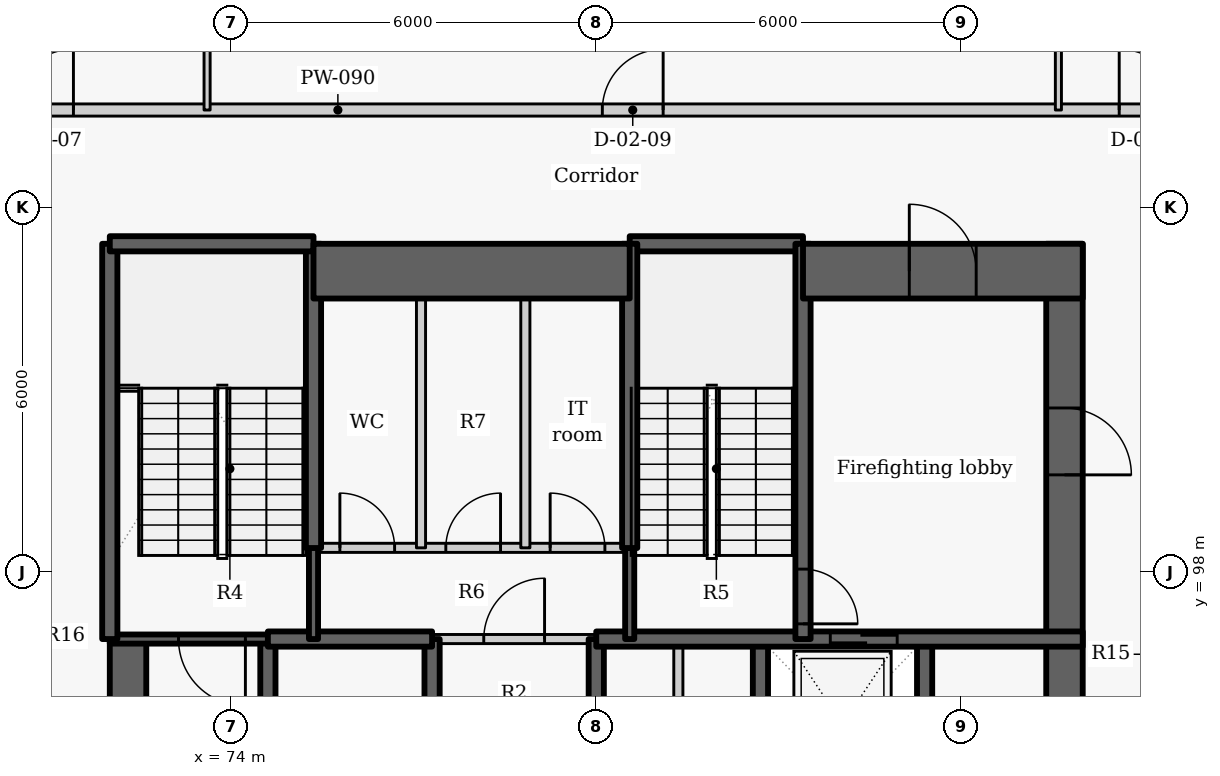
"""IFC4 building model, lengths in metres.
Left out: names, types, materials, properties, quantities, classifications, styles, units other than length and angle.
Written with IfcOpenShell. Run it as: python <this file> out.ifc"""

import sys

from ifc_helpers import new_model, si_unit, direction, frame, frame_2d, origin, place, context, subcontext, project, spatial, rectangle, extrude, element, fill, save


model = new_model("IFC4")
c1 = context("Model", 3, precision=1e-05, world=origin(), true_north=direction((0.0, 1.0)))
c2 = subcontext(c1, "Body", "Model", "MODEL_VIEW")
j1 = project(units=[si_unit("LENGTHUNIT", "METRE"), si_unit("PLANEANGLEUNIT", "RADIAN")], contexts=[c1])
p1 = place(None, origin())
s1 = spatial("IfcSite", under=j1, at=p1, CompositionType="ELEMENT")
p2 = place(p1, origin())
s2 = spatial("IfcBuilding", under=s1, at=p2, CompositionType="ELEMENT")
p3 = place(p2, frame((0.0, 0.0, 15.6)))
s3 = spatial("IfcBuildingStorey", under=s2, at=p3, CompositionType="ELEMENT", Elevation=15.6)
p4 = place(p3, frame((74.6, 94.1, -0.3), z_axis=(0.0, 0.0, 1.0), x_axis=(0.0, 1.0, 0.0)))
e1 = element("IfcWall", 1, at=p4, inside=s3, PredefinedType="SHEAR", context=c2, shape_type="SweptSolid", body=[
    extrude(rectangle(XDim=2.8, YDim=0.25, at=frame_2d((1.4, 0.0))), origin(), (0.0, 0.0, 1.0), 4.2),
])
p5 = place(p3, frame((72.3, 87.8, -0.3), z_axis=(0.0, 0.0, 1.0), x_axis=(0.0, 1.0, 0.0)))
e2 = element("IfcWall", 2, at=p5, inside=s3, PredefinedType="SHEAR", context=c2, shape_type="SweptSolid", body=[
    extrude(rectangle(XDim=9.1, YDim=0.6, at=frame_2d((4.55, 0.0))), origin(), (0.0, 0.0, 1.0), 4.2),
])
for number, where, z_axis, x_axis in (
    (3, (77.3, 94.1, -0.3), (0.0, 0.0, 1.0), (0.0, 1.0, 0.0)),
    (4, (80.0, 94.1, -0.3), (0.0, 0.0, 1.0), (0.0, 1.0, 0.0)),
    (5, (82.7, 94.1, -0.3), (0.0, 0.0, 1.0), (0.0, 1.0, 0.0)),
    (6, (85.4, 94.1, -0.3), (0.0, 0.0, 1.0), (0.0, 1.0, 0.0)),
):
    element("IfcWall", number, at=place(p3, frame(where, z_axis=z_axis, x_axis=x_axis)), inside=s3, PredefinedType="SHEAR", context=c2, shape_type="SweptSolid", body=[
        extrude(rectangle(XDim=2.8, YDim=0.25, at=frame_2d((1.4, 0.0))), origin(), (0.0, 0.0, 1.0), 4.2),
    ])
p6 = place(p3, frame((87.7, 103.4, -0.3), z_axis=(0.0, 0.0, 1.0), x_axis=(0.0, -1.0, 0.0)))
e7 = element("IfcWall", 7, at=p6, inside=s3, PredefinedType="SHEAR", context=c2, shape_type="SweptSolid", body=[
    extrude(rectangle(XDim=15.6, YDim=0.6, at=frame_2d((7.8, 0.0))), origin(), (0.0, 0.0, 1.0), 4.2),
])
p7 = place(p6, frame((2.7, 0.0, 0.3)))
e8 = element("IfcOpeningElement", 8, at=p7, cuts=e7, PredefinedType="OPENING", context=c2, shape_type="SweptSolid", body=[
    extrude(rectangle(XDim=1.1, YDim=2.1, at=frame_2d((0.55, 1.05))), frame((0.0, 0.31, 0.0), z_axis=(0.0, -1.0, 0.0), x_axis=(1.0, 0.0, 0.0)), (0.0, 0.0, 1.0), 0.62),
])
p8 = place(p3, frame((74.6, 96.9, -0.3), z_axis=(0.0, 0.0, 1.0), x_axis=(-1.0, 0.0, 0.0)))
e9 = element("IfcWall", 9, at=p8, inside=s3, PredefinedType="SHEAR", context=c2, shape_type="SweptSolid", body=[
    extrude(rectangle(XDim=2.6, YDim=0.15, at=frame_2d((1.3, 0.0))), origin(), (0.0, 0.0, 1.0), 4.2),
])
p9 = place(p8, frame((0.37, 0.0, 0.3)))
e10 = element("IfcOpeningElement", 10, at=p9, cuts=e9, PredefinedType="OPENING", context=c2, shape_type="SweptSolid", body=[
    extrude(rectangle(XDim=1.1, YDim=2.1, at=frame_2d((0.55, 1.05))), frame((0.0, 0.085, 0.0), z_axis=(0.0, -1.0, 0.0), x_axis=(1.0, 0.0, 0.0)), (0.0, 0.0, 1.0), 0.17),
])
p10 = place(p3, frame((74.6, 96.9, -0.3), z_axis=(0.0, 0.0, 1.0), x_axis=(1.0, 0.0, 0.0)))
e11 = element("IfcWall", 11, at=p10, inside=s3, PredefinedType="SHEAR", context=c2, shape_type="SweptSolid", body=[
    extrude(rectangle(XDim=2.7, YDim=0.25, at=frame_2d((1.35, 0.0))), origin(), (0.0, 0.0, 1.0), 4.2),
])
p11 = place(p3, frame((80.0, 96.9, -0.3), z_axis=(0.0, 0.0, 1.0), x_axis=(1.0, 0.0, 0.0)))
e12 = element("IfcWall", 12, at=p11, inside=s3, PredefinedType="SHEAR", context=c2, shape_type="SweptSolid", body=[
    extrude(rectangle(XDim=8.0, YDim=0.25, at=frame_2d((4.0, 0.0))), origin(), (0.0, 0.0, 1.0), 4.2),
])
p12 = place(p11, frame((3.849, 0.0, 0.3)))
e13 = element("IfcOpeningElement", 13, at=p12, cuts=e12, PredefinedType="OPENING", context=c2, shape_type="SweptSolid", body=[
    extrude(rectangle(XDim=1.1, YDim=2.1, at=frame_2d((0.55, 1.05))), frame((0.0, 0.135, 0.0), z_axis=(0.0, -1.0, 0.0), x_axis=(1.0, 0.0, 0.0)), (0.0, 0.0, 1.0), 0.27),
])
p13 = place(p3, frame((77.3, 96.9, 0.0), z_axis=(0.0, 0.0, 1.0), x_axis=(1.0, 0.0, 0.0)))
e14 = element("IfcWall", 14, at=p13, inside=s3, PredefinedType="PARTITIONING", context=c2, shape_type="SweptSolid", body=[
    extrude(rectangle(XDim=2.7, YDim=0.15, at=frame_2d((1.35, 0.0))), origin(), (0.0, 0.0, 1.0), 3.9),
])
p14 = place(p13, frame((0.85, 0.0, 0.0)))
e15 = element("IfcOpeningElement", 15, at=p14, cuts=e14, PredefinedType="OPENING", context=c2, shape_type="SweptSolid", body=[
    extrude(rectangle(XDim=1.0, YDim=2.1, at=frame_2d((0.5, 1.05))), frame((0.0, 0.085, 0.0), z_axis=(0.0, -1.0, 0.0), x_axis=(1.0, 0.0, 0.0)), (0.0, 0.0, 1.0), 0.17),
])
p15 = place(p3, frame((81.35, 94.1, 0.0), z_axis=(0.0, 0.0, 1.0), x_axis=(0.0, 1.0, 0.0)))
e16 = element("IfcWall", 16, at=p15, inside=s3, PredefinedType="PARTITIONING", context=c2, shape_type="SweptSolid", body=[
    extrude(rectangle(XDim=2.8, YDim=0.15, at=frame_2d((1.4, 0.0))), origin(), (0.0, 0.0, 1.0), 3.9),
])
p16 = place(p3, frame((75.35, 96.9, -0.3), z_axis=(0.0, 0.0, 1.0), x_axis=(0.0, 1.0, 0.0)))
e17 = element("IfcWall", 17, at=p16, inside=s3, PredefinedType="SHEAR", context=c2, shape_type="SweptSolid", body=[
    extrude(rectangle(XDim=1.503, YDim=0.15, at=frame_2d((0.751, 0.0))), origin(), (0.0, 0.0, 1.0), 4.2),
])
p17 = place(p3, frame((75.35, 98.397, -0.3), z_axis=(0.0, 0.0, 1.0), x_axis=(0.0, 1.0, 0.0)))
e18 = element("IfcWall", 18, at=p17, inside=s3, PredefinedType="SHEAR", context=c2, shape_type="SweptSolid", body=[
    extrude(rectangle(XDim=5.003, YDim=0.25, at=frame_2d((2.501, 0.0))), origin(), (0.0, 0.0, 1.0), 4.2),
])
p18 = place(p3, frame((72.0, 96.9, -0.3), z_axis=(0.0, 0.0, 1.0), x_axis=(0.0, 1.0, 0.0)))
e19 = element("IfcWall", 19, at=p18, inside=s3, PredefinedType="SHEAR", context=c2, shape_type="SweptSolid", body=[
    extrude(rectangle(XDim=6.5, YDim=0.25, at=frame_2d((3.25, 0.0))), origin(), (0.0, 0.0, 1.0), 4.2),
])
p19 = place(p3, frame((72.0, 103.4, -0.3), z_axis=(0.0, 0.0, 1.0), x_axis=(1.0, 0.0, 0.0)))
e20 = element("IfcWall", 20, at=p19, inside=s3, PredefinedType="SHEAR", context=c2, shape_type="SweptSolid", body=[
    extrude(rectangle(XDim=3.35, YDim=0.25, at=frame_2d((1.675, 0.0))), origin(), (0.0, 0.0, 1.0), 4.2),
])
p20 = place(p3, frame((80.55, 103.4, -0.3), z_axis=(0.0, 0.0, 1.0), x_axis=(1.0, 0.0, 0.0)))
e21 = element("IfcWall", 21, at=p20, inside=s3, PredefinedType="SHEAR", context=c2, shape_type="SweptSolid", body=[
    extrude(rectangle(XDim=2.85, YDim=0.25, at=frame_2d((1.425, 0.0))), origin(), (0.0, 0.0, 1.0), 4.2),
])
p21 = place(p3, frame((83.4, 103.4, -0.3), z_axis=(0.0, 0.0, 1.0), x_axis=(0.0, -1.0, 0.0)))
e22 = element("IfcWall", 22, at=p21, inside=s3, PredefinedType="SHEAR", context=c2, shape_type="SweptSolid", body=[
    extrude(rectangle(XDim=6.5, YDim=0.25, at=frame_2d((3.25, 0.0))), origin(), (0.0, 0.0, 1.0), 4.2),
])
p22 = place(p21, frame((5.35, 0.0, 0.3)))
e23 = element("IfcOpeningElement", 23, at=p22, cuts=e22, PredefinedType="OPENING", context=c2, shape_type="SweptSolid", body=[
    extrude(rectangle(XDim=0.9, YDim=2.1, at=frame_2d((0.45, 1.05))), frame((0.0, 0.135, 0.0), z_axis=(0.0, -1.0, 0.0), x_axis=(1.0, 0.0, 0.0)), (0.0, 0.0, 1.0), 0.27),
])
p23 = place(p3, frame((80.55, 96.9, -0.3), z_axis=(0.0, 0.0, 1.0), x_axis=(0.0, 1.0, 0.0)))
e24 = element("IfcWall", 24, at=p23, inside=s3, PredefinedType="SHEAR", context=c2, shape_type="SweptSolid", body=[
    extrude(rectangle(XDim=1.503, YDim=0.15, at=frame_2d((0.751, 0.0))), origin(), (0.0, 0.0, 1.0), 4.2),
])
p24 = place(p3, frame((80.55, 98.397, -0.3), z_axis=(0.0, 0.0, 1.0), x_axis=(0.0, 1.0, 0.0)))
e25 = element("IfcWall", 25, at=p24, inside=s3, PredefinedType="SHEAR", context=c2, shape_type="SweptSolid", body=[
    extrude(rectangle(XDim=5.003, YDim=0.25, at=frame_2d((2.501, 0.0))), origin(), (0.0, 0.0, 1.0), 4.2),
])
p25 = place(p3, frame((75.35, 102.95, -0.3), z_axis=(0.0, 0.0, 1.0), x_axis=(1.0, 0.0, 0.0)))
e26 = element("IfcWall", 26, at=p25, inside=s3, PredefinedType="SHEAR", context=c2, shape_type="SweptSolid", body=[
    extrude(rectangle(XDim=5.2, YDim=0.9, at=frame_2d((2.6, 0.0))), origin(), (0.0, 0.0, 1.0), 4.2),
])
p26 = place(p3, frame((83.4, 102.95, -0.3), z_axis=(0.0, 0.0, 1.0), x_axis=(1.0, 0.0, 0.0)))
e27 = element("IfcWall", 27, at=p26, inside=s3, PredefinedType="SHEAR", context=c2, shape_type="SweptSolid", body=[
    extrude(rectangle(XDim=4.6, YDim=0.9, at=frame_2d((2.3, 0.0))), origin(), (0.0, 0.0, 1.0), 4.2),
])
p27 = place(p26, frame((1.748, 0.0, 0.3)))
e28 = element("IfcOpeningElement", 28, at=p27, cuts=e27, PredefinedType="OPENING", context=c2, shape_type="SweptSolid", body=[
    extrude(rectangle(XDim=1.1, YDim=2.1, at=frame_2d((0.55, 1.05))), frame((0.0, 0.46, 0.0), z_axis=(0.0, -1.0, 0.0), x_axis=(1.0, 0.0, 0.0)), (0.0, 0.0, 1.0), 0.92),
])
p28 = place(p3, frame((75.35, 98.4, 0.0), z_axis=(0.0, 0.0, 1.0), x_axis=(1.0, 0.0, 0.0)))
e29 = element("IfcWall", 29, at=p28, inside=s3, PredefinedType="PARTITIONING", context=c2, shape_type="SweptSolid", body=[
    extrude(rectangle(XDim=5.2, YDim=0.15, at=frame_2d((2.6, 0.0))), origin(), (0.0, 0.0, 1.0), 3.9),
])
p29 = place(p28, frame((0.434, 0.0, 0.0)))
e30 = element("IfcOpeningElement", 30, at=p29, cuts=e29, PredefinedType="OPENING", context=c2, shape_type="SweptSolid", body=[
    extrude(rectangle(XDim=0.9, YDim=2.1, at=frame_2d((0.45, 1.05))), frame((0.0, 0.085, 0.0), z_axis=(0.0, -1.0, 0.0), x_axis=(1.0, 0.0, 0.0)), (0.0, 0.0, 1.0), 0.17),
])
p30 = place(p28, frame((2.176, 0.0, 0.0)))
e31 = element("IfcOpeningElement", 31, at=p30, cuts=e29, PredefinedType="OPENING", context=c2, shape_type="SweptSolid", body=[
    extrude(rectangle(XDim=0.9, YDim=2.1, at=frame_2d((0.45, 1.05))), frame((0.0, 0.085, 0.0), z_axis=(0.0, -1.0, 0.0), x_axis=(1.0, 0.0, 0.0)), (0.0, 0.0, 1.0), 0.17),
])
p31 = place(p28, frame((3.892, 0.0, 0.0)))
e32 = element("IfcOpeningElement", 32, at=p31, cuts=e29, PredefinedType="OPENING", context=c2, shape_type="SweptSolid", body=[
    extrude(rectangle(XDim=0.9, YDim=2.1, at=frame_2d((0.45, 1.05))), frame((0.0, 0.085, 0.0), z_axis=(0.0, -1.0, 0.0), x_axis=(1.0, 0.0, 0.0)), (0.0, 0.0, 1.0), 0.17),
])
for number, where, z_axis, x_axis in (
    (33, (77.118, 98.4, 0.0), (0.0, 0.0, 1.0), (0.0, 1.0, 0.0)),
    (34, (78.834, 98.4, 0.0), (0.0, 0.0, 1.0), (0.0, 1.0, 0.0)),
):
    element("IfcWall", number, at=place(p3, frame(where, z_axis=z_axis, x_axis=x_axis)), inside=s3, PredefinedType="PARTITIONING", context=c2, shape_type="SweptSolid", body=[
        extrude(rectangle(XDim=5.0, YDim=0.15, at=frame_2d((2.5, 0.0))), origin(), (0.0, 0.0, 1.0), 3.9),
    ])
p32 = place(p3, frame((69.8, 105.6, 0.0), z_axis=(0.0, 0.0, 1.0), x_axis=(1.0, 0.0, 0.0)))
e35 = element("IfcWall", 35, at=p32, inside=s3, PredefinedType="PARTITIONING", context=c2, shape_type="SweptSolid", body=[
    extrude(rectangle(XDim=20.4, YDim=0.2, at=frame_2d((10.2, 0.0))), origin(), (0.0, 0.0, 1.0), 3.9),
])
p33 = place(p32, frame((0.602, 0.0, 0.0)))
e36 = element("IfcOpeningElement", 36, at=p33, cuts=e35, PredefinedType="OPENING", context=c2, shape_type="SweptSolid", body=[
    extrude(rectangle(XDim=1.0, YDim=2.1, at=frame_2d((0.5, 1.05))), frame((0.0, 0.11, 0.0), z_axis=(0.0, -1.0, 0.0), x_axis=(1.0, 0.0, 0.0)), (0.0, 0.0, 1.0), 0.22),
])
p34 = place(p32, frame((18.8, 0.0, 0.0)))
e37 = element("IfcOpeningElement", 37, at=p34, cuts=e35, PredefinedType="OPENING", context=c2, shape_type="SweptSolid", body=[
    extrude(rectangle(XDim=1.0, YDim=2.1, at=frame_2d((0.5, 1.05))), frame((0.0, 0.11, 0.0), z_axis=(0.0, -1.0, 0.0), x_axis=(1.0, 0.0, 0.0)), (0.0, 0.0, 1.0), 0.22),
])
p35 = place(p32, frame((10.3, 0.0, 0.0)))
e38 = element("IfcOpeningElement", 38, at=p35, cuts=e35, PredefinedType="OPENING", context=c2, shape_type="SweptSolid", body=[
    extrude(rectangle(XDim=1.0, YDim=2.1, at=frame_2d((0.5, 1.05))), frame((0.0, 0.11, 0.0), z_axis=(0.0, -1.0, 0.0), x_axis=(1.0, 0.0, 0.0)), (0.0, 0.0, 1.0), 0.22),
])
for number, where, z_axis, x_axis in (
    (39, (73.6, 105.6, 0.0), (0.0, 0.0, 1.0), (0.0, 1.0, 0.0)),
    (40, (87.6, 105.6, 0.0), (0.0, 0.0, 1.0), (0.0, 1.0, 0.0)),
):
    element("IfcWall", number, at=place(p3, frame(where, z_axis=z_axis, x_axis=x_axis)), inside=s3, PredefinedType="PARTITIONING", context=c2, shape_type="SweptSolid", body=[
        extrude(rectangle(XDim=7.1, YDim=0.1, at=frame_2d((3.55, 0.0))), origin(), (0.0, 0.0, 1.0), 3.13),
    ])
p36 = place(p12, origin())
e41 = element("IfcDoor", 41, at=p36, inside=s3, OperationType="SLIDING_TO_LEFT", PredefinedType="DOOR", context=c2, shape_type="SweptSolid", body=[
    extrude(rectangle(XDim=1.1, YDim=2.1, at=frame_2d((0.55, 1.05))), frame((0.0, 0.025, 0.0), z_axis=(0.0, -1.0, 0.0), x_axis=(1.0, 0.0, 0.0)), (0.0, 0.0, 1.0), 0.05),
])
fill(e13, e41)
p37 = place(p14, origin())
e42 = element("IfcDoor", 42, at=p37, inside=s3, OperationType="SINGLE_SWING_RIGHT", PredefinedType="DOOR", context=c2, shape_type="SweptSolid", body=[
    extrude(rectangle(XDim=1.0, YDim=2.1, at=frame_2d((0.5, 1.05))), frame((0.0, 0.025, 0.0), z_axis=(0.0, -1.0, 0.0), x_axis=(1.0, 0.0, 0.0)), (0.0, 0.0, 1.0), 0.05),
])
fill(e15, e42)
p38 = place(p29, origin())
e43 = element("IfcDoor", 43, at=p38, inside=s3, OperationType="SINGLE_SWING_LEFT", PredefinedType="DOOR", context=c2, shape_type="SweptSolid", body=[
    extrude(rectangle(XDim=0.9, YDim=2.1, at=frame_2d((0.45, 1.05))), frame((0.0, 0.025, 0.0), z_axis=(0.0, -1.0, 0.0), x_axis=(1.0, 0.0, 0.0)), (0.0, 0.0, 1.0), 0.05),
])
fill(e30, e43)
p39 = place(p30, origin())
e44 = element("IfcDoor", 44, at=p39, inside=s3, OperationType="SINGLE_SWING_RIGHT", PredefinedType="DOOR", context=c2, shape_type="SweptSolid", body=[
    extrude(rectangle(XDim=0.9, YDim=2.1, at=frame_2d((0.45, 1.05))), frame((0.0, 0.025, 0.0), z_axis=(0.0, -1.0, 0.0), x_axis=(1.0, 0.0, 0.0)), (0.0, 0.0, 1.0), 0.05),
])
fill(e31, e44)
p40 = place(p31, origin())
e45 = element("IfcDoor", 45, at=p40, inside=s3, OperationType="SINGLE_SWING_LEFT", PredefinedType="DOOR", context=c2, shape_type="SweptSolid", body=[
    extrude(rectangle(XDim=0.9, YDim=2.1, at=frame_2d((0.45, 1.05))), frame((0.0, 0.025, 0.0), z_axis=(0.0, -1.0, 0.0), x_axis=(1.0, 0.0, 0.0)), (0.0, 0.0, 1.0), 0.05),
])
fill(e32, e45)
p41 = place(p9, origin())
e46 = element("IfcDoor", 46, at=p41, inside=s3, OperationType="SINGLE_SWING_LEFT", PredefinedType="DOOR", context=c2, shape_type="SweptSolid", body=[
    extrude(rectangle(XDim=1.1, YDim=2.1, at=frame_2d((0.55, 1.05))), frame((0.0, 0.025, 0.0), z_axis=(0.0, -1.0, 0.0), x_axis=(1.0, 0.0, 0.0)), (0.0, 0.0, 1.0), 0.05),
])
fill(e10, e46)
p42 = place(p22, origin())
e47 = element("IfcDoor", 47, at=p42, inside=s3, OperationType="SINGLE_SWING_RIGHT", PredefinedType="DOOR", context=c2, shape_type="SweptSolid", body=[
    extrude(rectangle(XDim=0.9, YDim=2.1, at=frame_2d((0.45, 1.05))), frame((0.0, 0.025, 0.0), z_axis=(0.0, -1.0, 0.0), x_axis=(1.0, 0.0, 0.0)), (0.0, 0.0, 1.0), 0.05),
])
fill(e23, e47)
p43 = place(p33, origin())
e48 = element("IfcDoor", 48, at=p43, inside=s3, OperationType="SINGLE_SWING_RIGHT", PredefinedType="DOOR", context=c2, shape_type="SweptSolid", body=[
    extrude(rectangle(XDim=1.0, YDim=2.1, at=frame_2d((0.5, 1.05))), frame((0.0, 0.025, 0.0), z_axis=(0.0, -1.0, 0.0), x_axis=(1.0, 0.0, 0.0)), (0.0, 0.0, 1.0), 0.05),
])
fill(e36, e48)
p44 = place(p34, origin())
e49 = element("IfcDoor", 49, at=p44, inside=s3, OperationType="SINGLE_SWING_LEFT", PredefinedType="DOOR", context=c2, shape_type="SweptSolid", body=[
    extrude(rectangle(XDim=1.0, YDim=2.1, at=frame_2d((0.5, 1.05))), frame((0.0, 0.025, 0.0), z_axis=(0.0, -1.0, 0.0), x_axis=(1.0, 0.0, 0.0)), (0.0, 0.0, 1.0), 0.05),
])
fill(e37, e49)
p45 = place(p35, origin())
e50 = element("IfcDoor", 50, at=p45, inside=s3, OperationType="SINGLE_SWING_RIGHT", PredefinedType="DOOR", context=c2, shape_type="SweptSolid", body=[
    extrude(rectangle(XDim=1.0, YDim=2.1, at=frame_2d((0.5, 1.05))), frame((0.0, 0.025, 0.0), z_axis=(0.0, -1.0, 0.0), x_axis=(1.0, 0.0, 0.0)), (0.0, 0.0, 1.0), 0.05),
])
fill(e38, e50)
p46 = place(p7, origin())
e51 = element("IfcDoor", 51, at=p46, inside=s3, OperationType="SINGLE_SWING_RIGHT", PredefinedType="DOOR", context=c2, shape_type="SweptSolid", body=[
    extrude(rectangle(XDim=1.1, YDim=2.1, at=frame_2d((0.55, 1.05))), frame((0.0, 0.025, 0.0), z_axis=(0.0, -1.0, 0.0), x_axis=(1.0, 0.0, 0.0)), (0.0, 0.0, 1.0), 0.05),
])
fill(e8, e51)
p47 = place(p27, origin())
e52 = element("IfcDoor", 52, at=p47, inside=s3, OperationType="SINGLE_SWING_LEFT", PredefinedType="DOOR", context=c2, shape_type="SweptSolid", body=[
    extrude(rectangle(XDim=1.1, YDim=2.1, at=frame_2d((0.55, 1.05))), frame((0.0, 0.025, 0.0), z_axis=(0.0, -1.0, 0.0), x_axis=(1.0, 0.0, 0.0)), (0.0, 0.0, 1.0), 0.05),
])
fill(e28, e52)
save(model, sys.argv[1])
